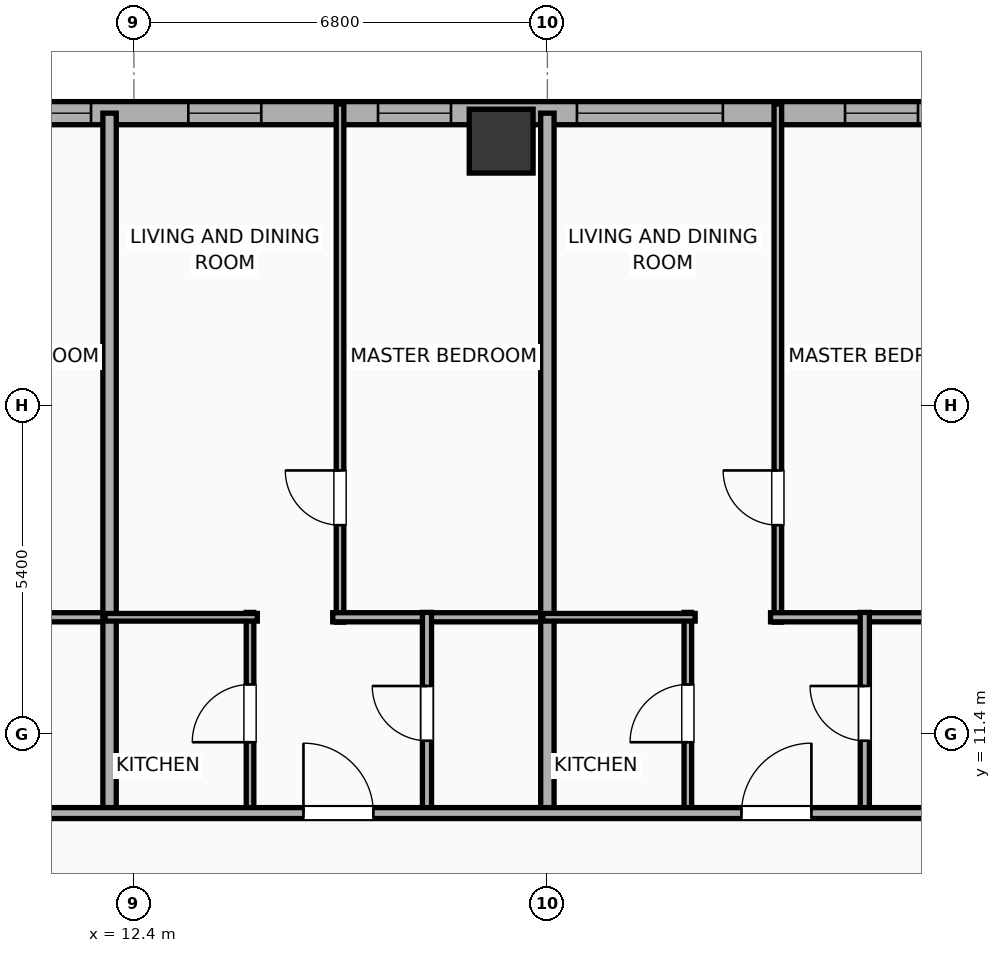
"""IFC4 building model, lengths in metres.
Left out: names, types, materials, properties, quantities, classifications, styles, units other than length and angle.
Written with IfcOpenShell. Run it as: python <this file> out.ifc"""

import sys

from ifc_helpers import new_model, si_unit, direction, frame, frame_2d, origin, origin_2d, place, context, subcontext, project, spatial, rectangle, hollow_rectangle, extrude, element, fill, save


model = new_model("IFC4")
c1 = context("Model", 3, precision=1e-05, world=origin(), true_north=direction((0.0, 1.0)))
c2 = subcontext(c1, "Body", "Model", "MODEL_VIEW")
j1 = project(units=[si_unit("LENGTHUNIT", "METRE"), si_unit("PLANEANGLEUNIT", "RADIAN")], contexts=[c1])
p1 = place(None, origin())
s1 = spatial("IfcSite", under=j1, at=p1, CompositionType="ELEMENT")
p2 = place(p1, origin())
s2 = spatial("IfcBuilding", under=s1, at=p2, CompositionType="ELEMENT")
p3 = place(p2, frame((0.0, 0.0, 136.5)))
s3 = spatial("IfcBuildingStorey", under=s2, at=p3, CompositionType="ELEMENT", Elevation=136.5)
p4 = place(p3, frame((18.44, 21.15, 0.0), z_axis=(0.0, 0.0, 1.0), x_axis=(1.0, 0.0, 0.0)))
e1 = element("IfcColumn", 1, at=p4, inside=s3, PredefinedType="COLUMN", context=c2, shape_type="SweptSolid", body=[
    extrude(hollow_rectangle(XDim=1.05, YDim=1.05, WallThickness=0.036, at=origin_2d()), origin(), (0.0, 0.0, 1.0), 3.865),
])
p5 = place(p3, frame((-25.381, 21.61, 0.0), z_axis=(0.0, 0.0, 1.0), x_axis=(1.0, 0.0, 0.0)))
e2 = element("IfcWall", 2, at=p5, inside=s3, PredefinedType="ELEMENTEDWALL", context=c2, shape_type="SweptSolid", body=[
    extrude(rectangle(XDim=54.763, YDim=0.38, at=frame_2d((27.381, 0.0))), origin(), (0.0, 0.0, 1.0), 2.39),
])
p6 = place(p5, frame((5.645, 0.0, 0.75)))
e3 = element("IfcOpeningElement", 3, at=p6, cuts=e2, PredefinedType="OPENING", context=c2, shape_type="SweptSolid", body=[
    extrude(rectangle(XDim=2.4, YDim=1.45, at=frame_2d((1.2, 0.725))), frame((0.0, 0.2, 0.0), z_axis=(0.0, -1.0, 0.0), x_axis=(1.0, 0.0, 0.0)), (0.0, 0.0, 1.0), 0.4),
])
p7 = place(p5, frame((34.677, 0.0, 0.75)))
e4 = element("IfcOpeningElement", 4, at=p7, cuts=e2, PredefinedType="OPENING", context=c2, shape_type="SweptSolid", body=[
    extrude(rectangle(XDim=2.4, YDim=1.45, at=frame_2d((1.2, 0.725))), frame((0.0, 0.2, 0.0), z_axis=(0.0, -1.0, 0.0), x_axis=(1.0, 0.0, 0.0)), (0.0, 0.0, 1.0), 0.4),
])
p8 = place(p5, frame((45.067, 0.0, 0.75)))
e5 = element("IfcOpeningElement", 5, at=p8, cuts=e2, PredefinedType="OPENING", context=c2, shape_type="SweptSolid", body=[
    extrude(rectangle(XDim=2.4, YDim=1.45, at=frame_2d((1.2, 0.725))), frame((0.0, 0.2, 0.0), z_axis=(0.0, -1.0, 0.0), x_axis=(1.0, 0.0, 0.0)), (0.0, 0.0, 1.0), 0.4),
])
p9 = place(p5, frame((2.938, 0.0, 0.55)))
e6 = element("IfcOpeningElement", 6, at=p9, cuts=e2, PredefinedType="OPENING", context=c2, shape_type="SweptSolid", body=[
    extrude(rectangle(XDim=1.2, YDim=1.15, at=frame_2d((0.6, 0.575))), frame((0.0, 0.2, 0.0), z_axis=(0.0, -1.0, 0.0), x_axis=(1.0, 0.0, 0.0)), (0.0, 0.0, 1.0), 0.4),
])
p10 = place(p5, frame((8.916, 0.0, 0.55)))
e7 = element("IfcOpeningElement", 7, at=p10, cuts=e2, PredefinedType="OPENING", context=c2, shape_type="SweptSolid", body=[
    extrude(rectangle(XDim=1.2, YDim=1.15, at=frame_2d((0.6, 0.575))), frame((0.0, 0.2, 0.0), z_axis=(0.0, -1.0, 0.0), x_axis=(1.0, 0.0, 0.0)), (0.0, 0.0, 1.0), 0.4),
])
p11 = place(p5, frame((13.476, 0.0, 0.55)))
e8 = element("IfcOpeningElement", 8, at=p11, cuts=e2, PredefinedType="OPENING", context=c2, shape_type="SweptSolid", body=[
    extrude(rectangle(XDim=1.2, YDim=1.15, at=frame_2d((0.6, 0.575))), frame((0.0, 0.2, 0.0), z_axis=(0.0, -1.0, 0.0), x_axis=(1.0, 0.0, 0.0)), (0.0, 0.0, 1.0), 0.4),
])
p12 = place(p5, frame((17.076, 0.0, 0.55)))
e9 = element("IfcOpeningElement", 9, at=p12, cuts=e2, PredefinedType="OPENING", context=c2, shape_type="SweptSolid", body=[
    extrude(rectangle(XDim=1.2, YDim=1.15, at=frame_2d((0.6, 0.575))), frame((0.0, 0.2, 0.0), z_axis=(0.0, -1.0, 0.0), x_axis=(1.0, 0.0, 0.0)), (0.0, 0.0, 1.0), 0.4),
])
p13 = place(p5, frame((19.956, 0.0, 0.55)))
e10 = element("IfcOpeningElement", 10, at=p13, cuts=e2, PredefinedType="OPENING", context=c2, shape_type="SweptSolid", body=[
    extrude(rectangle(XDim=1.2, YDim=1.15, at=frame_2d((0.6, 0.575))), frame((0.0, 0.2, 0.0), z_axis=(0.0, -1.0, 0.0), x_axis=(1.0, 0.0, 0.0)), (0.0, 0.0, 1.0), 0.4),
])
p14 = place(p5, frame((24.276, 0.0, 0.55)))
e11 = element("IfcOpeningElement", 11, at=p14, cuts=e2, PredefinedType="OPENING", context=c2, shape_type="SweptSolid", body=[
    extrude(rectangle(XDim=1.2, YDim=1.15, at=frame_2d((0.6, 0.575))), frame((0.0, 0.2, 0.0), z_axis=(0.0, -1.0, 0.0), x_axis=(1.0, 0.0, 0.0)), (0.0, 0.0, 1.0), 0.4),
])
p15 = place(p5, frame((27.876, 0.0, 0.55)))
e12 = element("IfcOpeningElement", 12, at=p15, cuts=e2, PredefinedType="OPENING", context=c2, shape_type="SweptSolid", body=[
    extrude(rectangle(XDim=1.2, YDim=1.15, at=frame_2d((0.6, 0.575))), frame((0.0, 0.2, 0.0), z_axis=(0.0, -1.0, 0.0), x_axis=(1.0, 0.0, 0.0)), (0.0, 0.0, 1.0), 0.4),
])
p16 = place(p5, frame((30.876, 0.0, 0.55)))
e13 = element("IfcOpeningElement", 13, at=p16, cuts=e2, PredefinedType="OPENING", context=c2, shape_type="SweptSolid", body=[
    extrude(rectangle(XDim=1.2, YDim=1.15, at=frame_2d((0.6, 0.575))), frame((0.0, 0.2, 0.0), z_axis=(0.0, -1.0, 0.0), x_axis=(1.0, 0.0, 0.0)), (0.0, 0.0, 1.0), 0.4),
])
p17 = place(p5, frame((38.676, 0.0, 0.55)))
e14 = element("IfcOpeningElement", 14, at=p17, cuts=e2, PredefinedType="OPENING", context=c2, shape_type="SweptSolid", body=[
    extrude(rectangle(XDim=1.2, YDim=1.15, at=frame_2d((0.6, 0.575))), frame((0.0, 0.2, 0.0), z_axis=(0.0, -1.0, 0.0), x_axis=(1.0, 0.0, 0.0)), (0.0, 0.0, 1.0), 0.4),
])
p18 = place(p5, frame((41.796, 0.0, 0.55)))
e15 = element("IfcOpeningElement", 15, at=p18, cuts=e2, PredefinedType="OPENING", context=c2, shape_type="SweptSolid", body=[
    extrude(rectangle(XDim=1.2, YDim=1.15, at=frame_2d((0.6, 0.575))), frame((0.0, 0.2, 0.0), z_axis=(0.0, -1.0, 0.0), x_axis=(1.0, 0.0, 0.0)), (0.0, 0.0, 1.0), 0.4),
])
p19 = place(p5, frame((49.476, 0.0, 0.55)))
e16 = element("IfcOpeningElement", 16, at=p19, cuts=e2, PredefinedType="OPENING", context=c2, shape_type="SweptSolid", body=[
    extrude(rectangle(XDim=1.2, YDim=1.15, at=frame_2d((0.6, 0.575))), frame((0.0, 0.2, 0.0), z_axis=(0.0, -1.0, 0.0), x_axis=(1.0, 0.0, 0.0)), (0.0, 0.0, 1.0), 0.4),
])
p20 = place(p5, frame((52.227, 0.0, 0.55)))
e17 = element("IfcOpeningElement", 17, at=p20, cuts=e2, PredefinedType="OPENING", context=c2, shape_type="SweptSolid", body=[
    extrude(rectangle(XDim=1.2, YDim=1.15, at=frame_2d((0.6, 0.575))), frame((0.0, 0.2, 0.0), z_axis=(0.0, -1.0, 0.0), x_axis=(1.0, 0.0, 0.0)), (0.0, 0.0, 1.0), 0.4),
])
p21 = place(p3, frame((8.47, 13.32, 0.0), z_axis=(0.0, 0.0, 1.0), x_axis=(1.0, 0.0, 0.0)))
e18 = element("IfcWall", 18, at=p21, inside=s3, PredefinedType="PLUMBINGWALL", context=c2, shape_type="SweptSolid", body=[
    extrude(rectangle(XDim=3.605, YDim=0.15, at=frame_2d((1.802, 0.0))), origin(), (0.0, 0.0, 1.0), 3.5),
])
p22 = place(p3, frame((12.0, 10.02, 0.0), z_axis=(0.0, 0.0, 1.0), x_axis=(0.0, 1.0, 0.0)))
e19 = element("IfcWall", 19, at=p22, inside=s3, PredefinedType="PARTITIONING", context=c2, shape_type="SweptSolid", body=[
    extrude(rectangle(XDim=11.59, YDim=0.22, at=frame_2d((5.795, 0.0))), origin(), (0.0, 0.0, 1.0), 2.39),
])
p23 = place(p3, frame((15.79, 13.24, 0.0), z_axis=(0.0, 0.0, 1.0), x_axis=(0.0, 1.0, 0.0)))
e20 = element("IfcWall", 20, at=p23, inside=s3, PredefinedType="PARTITIONING", context=c2, shape_type="SweptSolid", body=[
    extrude(rectangle(XDim=8.52, YDim=0.125, at=frame_2d((4.26, 0.0))), origin(), (0.0, 0.0, 1.0), 3.5),
])
p24 = place(p23, frame((1.595, 0.0, 0.0)))
e21 = element("IfcOpeningElement", 21, at=p24, cuts=e20, PredefinedType="OPENING", context=c2, shape_type="SweptSolid", body=[
    extrude(rectangle(XDim=0.9, YDim=2.05, at=frame_2d((0.45, 1.025))), frame((0.0, 0.073, 0.0), z_axis=(0.0, -1.0, 0.0), x_axis=(1.0, 0.0, 0.0)), (0.0, 0.0, 1.0), 0.145),
])
p25 = place(p3, frame((15.67, 13.32, 0.0), z_axis=(0.0, 0.0, 1.0), x_axis=(1.0, 0.0, 0.0)))
e22 = element("IfcWall", 22, at=p25, inside=s3, PredefinedType="PLUMBINGWALL", context=c2, shape_type="SweptSolid", body=[
    extrude(rectangle(XDim=3.605, YDim=0.15, at=frame_2d((1.802, 0.0))), origin(), (0.0, 0.0, 1.0), 3.5),
])
p26 = place(p3, frame((14.31, 10.08, 0.0), z_axis=(0.0, 0.0, 1.0), x_axis=(0.0, 1.0, 0.0)))
e23 = element("IfcWall", 23, at=p26, inside=s3, PredefinedType="PARTITIONING", context=c2, shape_type="SweptSolid", body=[
    extrude(rectangle(XDim=3.32, YDim=0.125, at=frame_2d((1.66, 0.0))), origin(), (0.0, 0.0, 1.0), 3.5),
])
p27 = place(p26, frame((1.185, 0.0, 0.0)))
e24 = element("IfcOpeningElement", 24, at=p27, cuts=e23, PredefinedType="OPENING", context=c2, shape_type="SweptSolid", body=[
    extrude(rectangle(XDim=0.95, YDim=2.05, at=frame_2d((0.475, 1.025))), frame((0.0, 0.073, 0.0), z_axis=(0.0, -1.0, 0.0), x_axis=(1.0, 0.0, 0.0)), (0.0, 0.0, 1.0), 0.145),
])
p28 = place(p3, frame((11.925, 13.32, 0.0), z_axis=(0.0, 0.0, 1.0), x_axis=(1.0, 0.0, 0.0)))
e25 = element("IfcWall", 25, at=p28, inside=s3, PredefinedType="PARTITIONING", context=c2, shape_type="SweptSolid", body=[
    extrude(rectangle(XDim=2.505, YDim=0.125, at=frame_2d((1.252, 0.0))), origin(), (0.0, 0.0, 1.0), 3.5),
])
p29 = place(p3, frame((17.22, 10.08, 0.0), z_axis=(0.0, 0.0, 1.0), x_axis=(0.0, 1.0, 0.0)))
e26 = element("IfcWall", 26, at=p29, inside=s3, PredefinedType="PLUMBINGWALL", context=c2, shape_type="SweptSolid", body=[
    extrude(rectangle(XDim=3.32, YDim=0.15, at=frame_2d((1.66, 0.0))), origin(), (0.0, 0.0, 1.0), 3.5),
])
p30 = place(p29, frame((1.21, 0.0, 0.0)))
e27 = element("IfcOpeningElement", 27, at=p30, cuts=e26, PredefinedType="OPENING", context=c2, shape_type="SweptSolid", body=[
    extrude(rectangle(XDim=0.9, YDim=2.05, at=frame_2d((0.45, 1.025))), frame((0.0, 0.085, 0.0), z_axis=(0.0, -1.0, 0.0), x_axis=(1.0, 0.0, 0.0)), (0.0, 0.0, 1.0), 0.17),
])
p31 = place(p3, frame((19.2, 10.02, 0.0), z_axis=(0.0, 0.0, 1.0), x_axis=(0.0, 1.0, 0.0)))
e28 = element("IfcWall", 28, at=p31, inside=s3, PredefinedType="PARTITIONING", context=c2, shape_type="SweptSolid", body=[
    extrude(rectangle(XDim=11.59, YDim=0.22, at=frame_2d((5.795, 0.0))), origin(), (0.0, 0.0, 1.0), 3.5),
])
p32 = place(p3, frame((22.99, 13.24, 0.0), z_axis=(0.0, 0.0, 1.0), x_axis=(0.0, 1.0, 0.0)))
e29 = element("IfcWall", 29, at=p32, inside=s3, PredefinedType="PARTITIONING", context=c2, shape_type="SweptSolid", body=[
    extrude(rectangle(XDim=8.52, YDim=0.125, at=frame_2d((4.26, 0.0))), origin(), (0.0, 0.0, 1.0), 2.39),
])
p33 = place(p32, frame((1.595, 0.0, 0.0)))
e30 = element("IfcOpeningElement", 30, at=p33, cuts=e29, PredefinedType="OPENING", context=c2, shape_type="SweptSolid", body=[
    extrude(rectangle(XDim=0.9, YDim=2.05, at=frame_2d((0.45, 1.025))), frame((0.0, 0.073, 0.0), z_axis=(0.0, -1.0, 0.0), x_axis=(1.0, 0.0, 0.0)), (0.0, 0.0, 1.0), 0.145),
])
p34 = place(p3, frame((22.87, 13.32, 0.0), z_axis=(0.0, 0.0, 1.0), x_axis=(1.0, 0.0, 0.0)))
e31 = element("IfcWall", 31, at=p34, inside=s3, PredefinedType="PLUMBINGWALL", context=c2, shape_type="SweptSolid", body=[
    extrude(rectangle(XDim=3.605, YDim=0.15, at=frame_2d((1.802, 0.0))), origin(), (0.0, 0.0, 1.0), 3.5),
])
p35 = place(p3, frame((21.51, 10.08, 0.0), z_axis=(0.0, 0.0, 1.0), x_axis=(0.0, 1.0, 0.0)))
e32 = element("IfcWall", 32, at=p35, inside=s3, PredefinedType="PARTITIONING", context=c2, shape_type="SweptSolid", body=[
    extrude(rectangle(XDim=3.32, YDim=0.125, at=frame_2d((1.66, 0.0))), origin(), (0.0, 0.0, 1.0), 3.5),
])
p36 = place(p35, frame((1.185, 0.0, 0.0)))
e33 = element("IfcOpeningElement", 33, at=p36, cuts=e32, PredefinedType="OPENING", context=c2, shape_type="SweptSolid", body=[
    extrude(rectangle(XDim=0.95, YDim=2.05, at=frame_2d((0.475, 1.025))), frame((0.0, 0.073, 0.0), z_axis=(0.0, -1.0, 0.0), x_axis=(1.0, 0.0, 0.0)), (0.0, 0.0, 1.0), 0.145),
])
p37 = place(p3, frame((19.125, 13.32, 0.0), z_axis=(0.0, 0.0, 1.0), x_axis=(1.0, 0.0, 0.0)))
e34 = element("IfcWall", 34, at=p37, inside=s3, PredefinedType="PARTITIONING", context=c2, shape_type="SweptSolid", body=[
    extrude(rectangle(XDim=2.505, YDim=0.125, at=frame_2d((1.252, 0.0))), origin(), (0.0, 0.0, 1.0), 3.5),
])
p38 = place(p3, frame((24.42, 10.08, 0.0), z_axis=(0.0, 0.0, 1.0), x_axis=(0.0, 1.0, 0.0)))
e35 = element("IfcWall", 35, at=p38, inside=s3, PredefinedType="PLUMBINGWALL", context=c2, shape_type="SweptSolid", body=[
    extrude(rectangle(XDim=3.32, YDim=0.15, at=frame_2d((1.66, 0.0))), origin(), (0.0, 0.0, 1.0), 2.39),
])
p39 = place(p38, frame((1.21, 0.0, 0.0)))
e36 = element("IfcOpeningElement", 36, at=p39, cuts=e35, PredefinedType="OPENING", context=c2, shape_type="SweptSolid", body=[
    extrude(rectangle(XDim=0.9, YDim=2.05, at=frame_2d((0.45, 1.025))), frame((0.0, 0.085, 0.0), z_axis=(0.0, -1.0, 0.0), x_axis=(1.0, 0.0, 0.0)), (0.0, 0.0, 1.0), 0.17),
])
p40 = place(p3, frame((-29.21, 10.1, 0.0), z_axis=(0.0, 0.0, 1.0), x_axis=(1.0, 0.0, 0.0)))
e37 = element("IfcWall", 37, at=p40, inside=s3, PredefinedType="PARTITIONING", context=c2, shape_type="SweptSolid", body=[
    extrude(rectangle(XDim=62.42, YDim=0.18, at=frame_2d((31.21, 0.0))), origin(), (0.0, 0.0, 1.0), 2.39),
])
p41 = place(p40, frame((2.74, 0.0, 0.0)))
e38 = element("IfcOpeningElement", 38, at=p41, cuts=e37, PredefinedType="OPENING", context=c2, shape_type="SweptSolid", body=[
    extrude(rectangle(XDim=0.9, YDim=2.05, at=frame_2d((0.45, 1.025))), frame((0.0, 0.1, 0.0), z_axis=(0.0, -1.0, 0.0), x_axis=(1.0, 0.0, 0.0)), (0.0, 0.0, 1.0), 0.2),
])
p42 = place(p40, frame((9.868, 0.0, 0.0)))
e39 = element("IfcOpeningElement", 39, at=p42, cuts=e37, PredefinedType="OPENING", context=c2, shape_type="SweptSolid", body=[
    extrude(rectangle(XDim=1.15, YDim=2.05, at=frame_2d((0.575, 1.025))), frame((0.0, 0.1, 0.0), z_axis=(0.0, -1.0, 0.0), x_axis=(1.0, 0.0, 0.0)), (0.0, 0.0, 1.0), 0.2),
])
p43 = place(p40, frame((15.598, 0.0, 0.0)))
e40 = element("IfcOpeningElement", 40, at=p43, cuts=e37, PredefinedType="OPENING", context=c2, shape_type="SweptSolid", body=[
    extrude(rectangle(XDim=1.15, YDim=2.05, at=frame_2d((0.575, 1.025))), frame((0.0, 0.1, 0.0), z_axis=(0.0, -1.0, 0.0), x_axis=(1.0, 0.0, 0.0)), (0.0, 0.0, 1.0), 0.2),
])
p44 = place(p40, frame((22.801, 0.0, 0.0)))
e41 = element("IfcOpeningElement", 41, at=p44, cuts=e37, PredefinedType="OPENING", context=c2, shape_type="SweptSolid", body=[
    extrude(rectangle(XDim=1.15, YDim=2.05, at=frame_2d((0.575, 1.025))), frame((0.0, 0.1, 0.0), z_axis=(0.0, -1.0, 0.0), x_axis=(1.0, 0.0, 0.0)), (0.0, 0.0, 1.0), 0.2),
])
p45 = place(p40, frame((29.998, 0.0, 0.0)))
e42 = element("IfcOpeningElement", 42, at=p45, cuts=e37, PredefinedType="OPENING", context=c2, shape_type="SweptSolid", body=[
    extrude(rectangle(XDim=1.15, YDim=2.05, at=frame_2d((0.575, 1.025))), frame((0.0, 0.1, 0.0), z_axis=(0.0, -1.0, 0.0), x_axis=(1.0, 0.0, 0.0)), (0.0, 0.0, 1.0), 0.2),
])
p46 = place(p40, frame((37.202, 0.0, 0.0)))
e43 = element("IfcOpeningElement", 43, at=p46, cuts=e37, PredefinedType="OPENING", context=c2, shape_type="SweptSolid", body=[
    extrude(rectangle(XDim=1.15, YDim=2.05, at=frame_2d((0.575, 1.025))), frame((0.0, 0.1, 0.0), z_axis=(0.0, -1.0, 0.0), x_axis=(1.0, 0.0, 0.0)), (0.0, 0.0, 1.0), 0.2),
])
p47 = place(p40, frame((44.399, 0.0, 0.0)))
e44 = element("IfcOpeningElement", 44, at=p47, cuts=e37, PredefinedType="OPENING", context=c2, shape_type="SweptSolid", body=[
    extrude(rectangle(XDim=1.15, YDim=2.05, at=frame_2d((0.575, 1.025))), frame((0.0, 0.1, 0.0), z_axis=(0.0, -1.0, 0.0), x_axis=(1.0, 0.0, 0.0)), (0.0, 0.0, 1.0), 0.2),
])
p48 = place(p40, frame((51.602, 0.0, 0.0)))
e45 = element("IfcOpeningElement", 45, at=p48, cuts=e37, PredefinedType="OPENING", context=c2, shape_type="SweptSolid", body=[
    extrude(rectangle(XDim=1.15, YDim=2.05, at=frame_2d((0.575, 1.025))), frame((0.0, 0.1, 0.0), z_axis=(0.0, -1.0, 0.0), x_axis=(1.0, 0.0, 0.0)), (0.0, 0.0, 1.0), 0.2),
])
p49 = place(p40, frame((58.762, 0.0, 0.0)))
e46 = element("IfcOpeningElement", 46, at=p49, cuts=e37, PredefinedType="OPENING", context=c2, shape_type="SweptSolid", body=[
    extrude(rectangle(XDim=0.9, YDim=2.05, at=frame_2d((0.45, 1.025))), frame((0.0, 0.1, 0.0), z_axis=(0.0, -1.0, 0.0), x_axis=(1.0, 0.0, 0.0)), (0.0, 0.0, 1.0), 0.2),
])
p50 = place(p7, origin())
e47 = element("IfcWindow", 47, at=p50, inside=s3, PartitioningType="SINGLE_PANEL", PredefinedType="WINDOW", context=c2, shape_type="SweptSolid", body=[
    extrude(rectangle(XDim=2.4, YDim=1.45, at=frame_2d((1.2, 0.725))), frame((0.0, 0.03, 0.0), z_axis=(0.0, -1.0, 0.0), x_axis=(1.0, 0.0, 0.0)), (0.0, 0.0, 1.0), 0.06),
])
fill(e4, e47)
p51 = place(p8, origin())
e48 = element("IfcWindow", 48, at=p51, inside=s3, PartitioningType="SINGLE_PANEL", PredefinedType="WINDOW", context=c2, shape_type="SweptSolid", body=[
    extrude(rectangle(XDim=2.4, YDim=1.45, at=frame_2d((1.2, 0.725))), frame((0.0, 0.03, 0.0), z_axis=(0.0, -1.0, 0.0), x_axis=(1.0, 0.0, 0.0)), (0.0, 0.0, 1.0), 0.06),
])
fill(e5, e48)
p52 = place(p17, origin())
e49 = element("IfcWindow", 49, at=p52, inside=s3, PartitioningType="SINGLE_PANEL", PredefinedType="WINDOW", context=c2, shape_type="SweptSolid", body=[
    extrude(rectangle(XDim=1.2, YDim=1.15, at=frame_2d((0.6, 0.575))), frame((0.0, 0.03, 0.0), z_axis=(0.0, -1.0, 0.0), x_axis=(1.0, 0.0, 0.0)), (0.0, 0.0, 1.0), 0.06),
])
fill(e14, e49)
p53 = place(p18, origin())
e50 = element("IfcWindow", 50, at=p53, inside=s3, PartitioningType="SINGLE_PANEL", PredefinedType="WINDOW", context=c2, shape_type="SweptSolid", body=[
    extrude(rectangle(XDim=1.2, YDim=1.15, at=frame_2d((0.6, 0.575))), frame((0.0, 0.03, 0.0), z_axis=(0.0, -1.0, 0.0), x_axis=(1.0, 0.0, 0.0)), (0.0, 0.0, 1.0), 0.06),
])
fill(e15, e50)
p54 = place(p19, origin())
e51 = element("IfcWindow", 51, at=p54, inside=s3, PartitioningType="SINGLE_PANEL", PredefinedType="WINDOW", context=c2, shape_type="SweptSolid", body=[
    extrude(rectangle(XDim=1.2, YDim=1.15, at=frame_2d((0.6, 0.575))), frame((0.0, 0.03, 0.0), z_axis=(0.0, -1.0, 0.0), x_axis=(1.0, 0.0, 0.0)), (0.0, 0.0, 1.0), 0.06),
])
fill(e16, e51)
p55 = place(p24, origin())
e52 = element("IfcDoor", 52, at=p55, inside=s3, OperationType="SINGLE_SWING_RIGHT", PredefinedType="DOOR", context=c2, shape_type="SweptSolid", body=[
    extrude(rectangle(XDim=0.9, YDim=2.05, at=frame_2d((0.45, 1.025))), frame((0.0, 0.025, 0.0), z_axis=(0.0, -1.0, 0.0), x_axis=(1.0, 0.0, 0.0)), (0.0, 0.0, 1.0), 0.05),
])
fill(e21, e52)
p56 = place(p27, origin())
e53 = element("IfcDoor", 53, at=p56, inside=s3, OperationType="SINGLE_SWING_LEFT", PredefinedType="DOOR", context=c2, shape_type="SweptSolid", body=[
    extrude(rectangle(XDim=0.95, YDim=2.05, at=frame_2d((0.475, 1.025))), frame((0.0, 0.025, 0.0), z_axis=(0.0, -1.0, 0.0), x_axis=(1.0, 0.0, 0.0)), (0.0, 0.0, 1.0), 0.05),
])
fill(e24, e53)
p57 = place(p30, origin())
e54 = element("IfcDoor", 54, at=p57, inside=s3, OperationType="SINGLE_SWING_RIGHT", PredefinedType="DOOR", context=c2, shape_type="SweptSolid", body=[
    extrude(rectangle(XDim=0.9, YDim=2.05, at=frame_2d((0.45, 1.025))), frame((0.0, 0.025, 0.0), z_axis=(0.0, -1.0, 0.0), x_axis=(1.0, 0.0, 0.0)), (0.0, 0.0, 1.0), 0.05),
])
fill(e27, e54)
p58 = place(p33, origin())
e55 = element("IfcDoor", 55, at=p58, inside=s3, OperationType="SINGLE_SWING_RIGHT", PredefinedType="DOOR", context=c2, shape_type="SweptSolid", body=[
    extrude(rectangle(XDim=0.9, YDim=2.05, at=frame_2d((0.45, 1.025))), frame((0.0, 0.025, 0.0), z_axis=(0.0, -1.0, 0.0), x_axis=(1.0, 0.0, 0.0)), (0.0, 0.0, 1.0), 0.05),
])
fill(e30, e55)
p59 = place(p36, origin())
e56 = element("IfcDoor", 56, at=p59, inside=s3, OperationType="SINGLE_SWING_LEFT", PredefinedType="DOOR", context=c2, shape_type="SweptSolid", body=[
    extrude(rectangle(XDim=0.95, YDim=2.05, at=frame_2d((0.475, 1.025))), frame((0.0, 0.025, 0.0), z_axis=(0.0, -1.0, 0.0), x_axis=(1.0, 0.0, 0.0)), (0.0, 0.0, 1.0), 0.05),
])
fill(e33, e56)
p60 = place(p39, origin())
e57 = element("IfcDoor", 57, at=p60, inside=s3, OperationType="SINGLE_SWING_RIGHT", PredefinedType="DOOR", context=c2, shape_type="SweptSolid", body=[
    extrude(rectangle(XDim=0.9, YDim=2.05, at=frame_2d((0.45, 1.025))), frame((0.0, 0.025, 0.0), z_axis=(0.0, -1.0, 0.0), x_axis=(1.0, 0.0, 0.0)), (0.0, 0.0, 1.0), 0.05),
])
fill(e36, e57)
p61 = place(p47, origin())
e58 = element("IfcDoor", 58, at=p61, inside=s3, OperationType="SINGLE_SWING_LEFT", PredefinedType="DOOR", context=c2, shape_type="SweptSolid", body=[
    extrude(rectangle(XDim=1.15, YDim=2.05, at=frame_2d((0.575, 1.025))), frame((0.0, 0.025, 0.0), z_axis=(0.0, -1.0, 0.0), x_axis=(1.0, 0.0, 0.0)), (0.0, 0.0, 1.0), 0.05),
])
fill(e44, e58)
p62 = place(p48, origin())
e59 = element("IfcDoor", 59, at=p62, inside=s3, OperationType="SINGLE_SWING_RIGHT", PredefinedType="DOOR", context=c2, shape_type="SweptSolid", body=[
    extrude(rectangle(XDim=1.15, YDim=2.05, at=frame_2d((0.575, 1.025))), frame((0.0, 0.025, 0.0), z_axis=(0.0, -1.0, 0.0), x_axis=(1.0, 0.0, 0.0)), (0.0, 0.0, 1.0), 0.05),
])
fill(e45, e59)
save(model, sys.argv[1])
